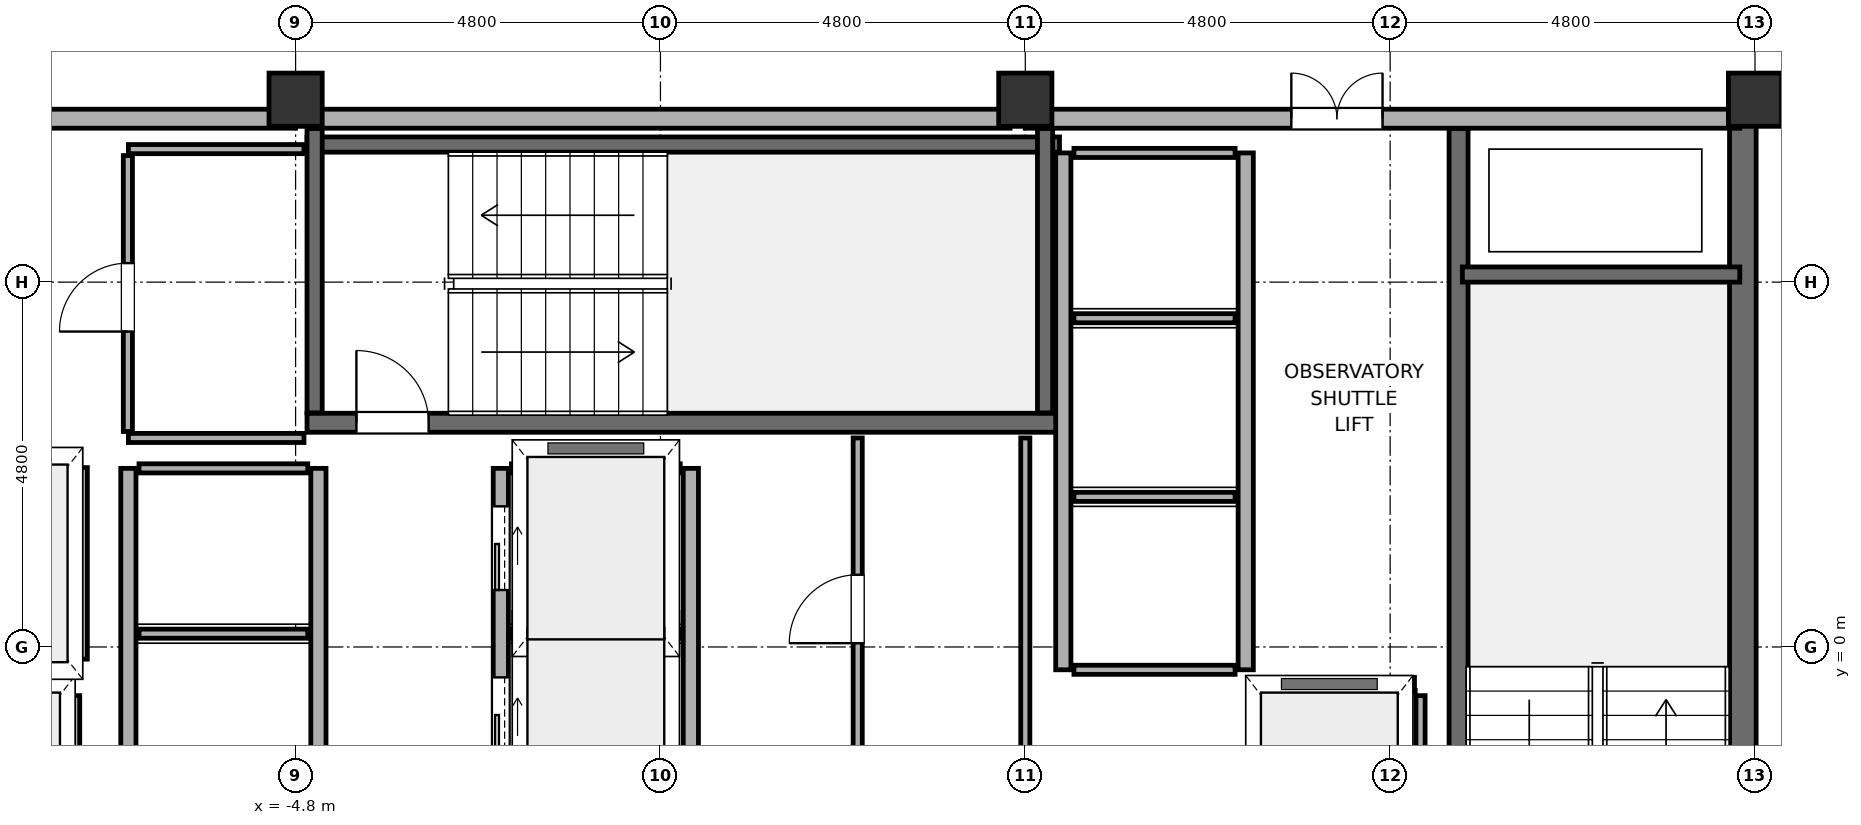
"""IFC4 building model, lengths in metres.
Left out: names, types, materials, properties, quantities, classifications, styles, units other than length and angle.
Written with IfcOpenShell. Run it as: python <this file> out.ifc"""

import sys

from ifc_helpers import new_model, si_unit, direction, frame, frame_2d, origin, origin_2d, place, context, subcontext, project, spatial, rectangle, hollow_rectangle, extrude, element, fill, save


model = new_model("IFC4")
c1 = context("Model", 3, precision=1e-05, world=origin(), true_north=direction((0.0, 1.0)))
c2 = subcontext(c1, "Body", "Model", "MODEL_VIEW")
j1 = project(units=[si_unit("LENGTHUNIT", "METRE"), si_unit("PLANEANGLEUNIT", "RADIAN")], contexts=[c1])
p1 = place(None, origin())
s1 = spatial("IfcSite", under=j1, at=p1, CompositionType="ELEMENT")
p2 = place(p1, origin())
s2 = spatial("IfcBuilding", under=s1, at=p2, CompositionType="ELEMENT")
p3 = place(p2, frame((0.0, 0.0, 124.8)))
s3 = spatial("IfcBuildingStorey", under=s2, at=p3, CompositionType="ELEMENT", Elevation=124.8)
for number, where, z_axis, x_axis in (
    (1, (-4.8, 7.2, 0.0), (0.0, 0.0, 1.0), (1.0, 0.0, 0.0)),
    (2, (4.8, 7.2, 0.0), (0.0, 0.0, 1.0), (1.0, 0.0, 0.0)),
    (3, (14.4, 7.2, 0.0), (0.0, 0.0, 1.0), (1.0, 0.0, 0.0)),
):
    element("IfcColumn", number, at=place(p3, frame(where, z_axis=z_axis, x_axis=x_axis)), inside=s3, PredefinedType="COLUMN", context=c2, shape_type="SweptSolid", body=[
        extrude(hollow_rectangle(XDim=0.7, YDim=0.7, WallThickness=0.032, at=origin_2d()), origin(), (0.0, 0.0, 1.0), 3.7),
    ])
p4 = place(p3, frame((14.24, -7.2, -0.18), z_axis=(0.0, 0.0, 1.0), x_axis=(0.0, 1.0, 0.0)))
e4 = element("IfcWall", 4, at=p4, inside=s3, PredefinedType="SHEAR", context=c2, shape_type="SweptSolid", body=[
    extrude(rectangle(XDim=14.4, YDim=0.35, at=frame_2d((7.2, 0.0))), origin(), (0.0, 0.0, 1.0), 3.7),
])
p5 = place(p3, frame((-14.2, 6.95, 0.0), z_axis=(0.0, 0.0, 1.0), x_axis=(1.0, 0.0, 0.0)))
e5 = element("IfcWall", 5, at=p5, inside=s3, PredefinedType="SOLIDWALL", context=c2, shape_type="SweptSolid", body=[
    extrude(rectangle(XDim=9.4, YDim=0.25, at=frame_2d((4.7, 0.0))), origin(), (0.0, 0.0, 1.0), 2.12),
])
p6 = place(p5, frame((4.9, 0.0, 0.0)))
e6 = element("IfcOpeningElement", 6, at=p6, cuts=e5, PredefinedType="OPENING", context=c2, shape_type="SweptSolid", body=[
    extrude(rectangle(XDim=1.0, YDim=2.02, at=frame_2d((0.5, 1.01))), frame((0.0, 0.14, 0.0), z_axis=(0.0, -1.0, 0.0), x_axis=(1.0, 0.0, 0.0)), (0.0, 0.0, 1.0), 0.28),
])
p7 = place(p3, frame((-4.6, 6.95, 0.0), z_axis=(0.0, 0.0, 1.0), x_axis=(1.0, 0.0, 0.0)))
e7 = element("IfcWall", 7, at=p7, inside=s3, PredefinedType="SOLIDWALL", context=c2, shape_type="SweptSolid", body=[
    extrude(rectangle(XDim=9.2, YDim=0.25, at=frame_2d((4.6, 0.0))), origin(), (0.0, 0.0, 1.0), 2.12),
])
p8 = place(p3, frame((4.8, 6.95, 0.0), z_axis=(0.0, 0.0, 1.0), x_axis=(1.0, 0.0, 0.0)))
e8 = element("IfcWall", 8, at=p8, inside=s3, PredefinedType="SOLIDWALL", context=c2, shape_type="SweptSolid", body=[
    extrude(rectangle(XDim=9.4, YDim=0.25, at=frame_2d((4.7, 0.0))), origin(), (0.0, 0.0, 1.0), 2.12),
])
p9 = place(p8, frame((3.5, 0.0, 0.0)))
e9 = element("IfcOpeningElement", 9, at=p9, cuts=e8, PredefinedType="OPENING", context=c2, shape_type="SweptSolid", body=[
    extrude(rectangle(XDim=1.2, YDim=2.02, at=frame_2d((0.6, 1.01))), frame((0.0, 0.14, 0.0), z_axis=(0.0, -1.0, 0.0), x_axis=(1.0, 0.0, 0.0)), (0.0, 0.0, 1.0), 0.28),
])
p10 = place(p3, frame((10.5, -6.82, -0.18), z_axis=(0.0, 0.0, 1.0), x_axis=(0.0, 1.0, 0.0)))
e10 = element("IfcWall", 10, at=p10, inside=s3, PredefinedType="SOLIDWALL", context=c2, shape_type="SweptSolid", body=[
    extrude(rectangle(XDim=13.64, YDim=0.25, at=frame_2d((6.82, 0.0))), origin(), (0.0, 0.0, 1.0), 3.7),
])
p11 = place(p10, frame((2.32, 0.0, 0.18)))
e11 = element("IfcOpeningElement", 11, at=p11, cuts=e10, PredefinedType="OPENING", context=c2, shape_type="SweptSolid", body=[
    extrude(rectangle(XDim=0.95, YDim=2.15, at=frame_2d((0.475, 1.075))), frame((0.0, 0.14, 0.0), z_axis=(0.0, -1.0, 0.0), x_axis=(1.0, 0.0, 0.0)), (0.0, 0.0, 1.0), 0.28),
])
p12 = place(p3, frame((10.55, 4.9, -0.18), z_axis=(0.0, 0.0, 1.0), x_axis=(1.0, 0.0, 0.0)))
e12 = element("IfcWall", 12, at=p12, inside=s3, PredefinedType="SOLIDWALL", context=c2, shape_type="SweptSolid", body=[
    extrude(rectangle(XDim=3.65, YDim=0.2, at=frame_2d((1.825, 0.0))), origin(), (0.0, 0.0, 1.0), 3.7),
])
p13 = place(p3, frame((-4.65, 2.95, -0.18), z_axis=(0.0, 0.0, 1.0), x_axis=(1.0, 0.0, 0.0)))
e13 = element("IfcWall", 13, at=p13, inside=s3, PredefinedType="SOLIDWALL", context=c2, shape_type="SweptSolid", body=[
    extrude(rectangle(XDim=9.9, YDim=0.25, at=frame_2d((4.95, 0.0))), origin(), (0.0, 0.0, 1.0), 3.7),
])
p14 = place(p13, frame((0.65, 0.0, 0.18)))
e14 = element("IfcOpeningElement", 14, at=p14, cuts=e13, PredefinedType="OPENING", context=c2, shape_type="SweptSolid", body=[
    extrude(rectangle(XDim=0.95, YDim=2.15, at=frame_2d((0.475, 1.075))), frame((0.0, 0.14, 0.0), z_axis=(0.0, -1.0, 0.0), x_axis=(1.0, 0.0, 0.0)), (0.0, 0.0, 1.0), 0.28),
])
p15 = place(p3, frame((-4.65, 6.61, -0.18), z_axis=(0.0, 0.0, 1.0), x_axis=(1.0, 0.0, 0.0)))
e15 = element("IfcWall", 15, at=p15, inside=s3, PredefinedType="SOLIDWALL", context=c2, shape_type="SweptSolid", body=[
    extrude(rectangle(XDim=9.9, YDim=0.2, at=frame_2d((4.95, 0.0))), origin(), (0.0, 0.0, 1.0), 3.7),
])
for number, where, z_axis, x_axis in (
    (16, (-4.55, 3.08, -0.18), (0.0, 0.0, 1.0), (0.0, 1.0, 0.0)),
    (17, (5.06, 3.08, -0.18), (0.0, 0.0, 1.0), (0.0, 1.0, 0.0)),
):
    element("IfcWall", number, at=place(p3, frame(where, z_axis=z_axis, x_axis=x_axis)), inside=s3, PredefinedType="SOLIDWALL", context=c2, shape_type="SweptSolid", body=[
        extrude(rectangle(XDim=3.74, YDim=0.2, at=frame_2d((1.87, 0.0))), origin(), (0.0, 0.0, 1.0), 3.7),
    ])
for number, where, z_axis, x_axis in (
    (18, (-4.5, -6.5, 0.0), (0.0, 0.0, 1.0), (0.0, 1.0, 0.0)),
    (19, (-7.0, -6.5, 0.0), (0.0, 0.0, 1.0), (0.0, 1.0, 0.0)),
):
    element("IfcWall", number, at=place(p3, frame(where, z_axis=z_axis, x_axis=x_axis)), inside=s3, PredefinedType="SOLIDWALL", context=c2, shape_type="SweptSolid", body=[
        extrude(rectangle(XDim=8.85, YDim=0.2, at=frame_2d((4.425, 0.0))), origin(), (0.0, 0.0, 1.0), 3.52),
    ])
for number, where, z_axis, x_axis in (
    (20, (-6.86, 0.175, 0.0), (0.0, 0.0, 1.0), (1.0, 0.0, 0.0)),
    (21, (-6.86, 2.35, 0.0), (0.0, 0.0, 1.0), (1.0, 0.0, 0.0)),
):
    element("IfcWall", number, at=place(p3, frame(where, z_axis=z_axis, x_axis=x_axis)), inside=s3, PredefinedType="PARTITIONING", context=c2, shape_type="SweptSolid", body=[
        extrude(rectangle(XDim=2.22, YDim=0.12, at=frame_2d((1.11, 0.0))), origin(), (0.0, 0.0, 1.0), 3.52),
    ])
p16 = place(p3, frame((-2.1, -6.5, 0.0), z_axis=(0.0, 0.0, 1.0), x_axis=(0.0, 1.0, 0.0)))
e22 = element("IfcWall", 22, at=p16, inside=s3, PredefinedType="SOLIDWALL", context=c2, shape_type="SweptSolid", body=[
    extrude(rectangle(XDim=8.85, YDim=0.2, at=frame_2d((4.425, 0.0))), origin(), (0.0, 0.0, 1.0), 3.52),
])
p17 = place(p16, frame((0.5, 0.0, 0.0)))
e23 = element("IfcOpeningElement", 23, at=p17, cuts=e22, PredefinedType="OPENING", context=c2, shape_type="SweptSolid", body=[
    extrude(rectangle(XDim=1.1, YDim=2.2, at=frame_2d((0.55, 1.1))), frame((0.0, 0.115, 0.0), z_axis=(0.0, -1.0, 0.0), x_axis=(1.0, 0.0, 0.0)), (0.0, 0.0, 1.0), 0.23),
])
p18 = place(p16, frame((2.75, 0.0, 0.0)))
e24 = element("IfcOpeningElement", 24, at=p18, cuts=e22, PredefinedType="OPENING", context=c2, shape_type="SweptSolid", body=[
    extrude(rectangle(XDim=1.1, YDim=2.2, at=frame_2d((0.55, 1.1))), frame((0.0, 0.115, 0.0), z_axis=(0.0, -1.0, 0.0), x_axis=(1.0, 0.0, 0.0)), (0.0, 0.0, 1.0), 0.23),
])
p19 = place(p16, frame((5.0, 0.0, 0.0)))
e25 = element("IfcOpeningElement", 25, at=p19, cuts=e22, PredefinedType="OPENING", context=c2, shape_type="SweptSolid", body=[
    extrude(rectangle(XDim=1.1, YDim=2.2, at=frame_2d((0.55, 1.1))), frame((0.0, 0.115, 0.0), z_axis=(0.0, -1.0, 0.0), x_axis=(1.0, 0.0, 0.0)), (0.0, 0.0, 1.0), 0.23),
])
p20 = place(p16, frame((7.25, 0.0, 0.0)))
e26 = element("IfcOpeningElement", 26, at=p20, cuts=e22, PredefinedType="OPENING", context=c2, shape_type="SweptSolid", body=[
    extrude(rectangle(XDim=1.1, YDim=2.2, at=frame_2d((0.55, 1.1))), frame((0.0, 0.115, 0.0), z_axis=(0.0, -1.0, 0.0), x_axis=(1.0, 0.0, 0.0)), (0.0, 0.0, 1.0), 0.23),
])
p21 = place(p3, frame((0.4, -6.5, 0.0), z_axis=(0.0, 0.0, 1.0), x_axis=(0.0, 1.0, 0.0)))
e27 = element("IfcWall", 27, at=p21, inside=s3, PredefinedType="SOLIDWALL", context=c2, shape_type="SweptSolid", body=[
    extrude(rectangle(XDim=8.85, YDim=0.2, at=frame_2d((4.425, 0.0))), origin(), (0.0, 0.0, 1.0), 3.52),
])
for number, where, z_axis, x_axis in (
    (28, (-1.96, 0.175, 0.0), (0.0, 0.0, 1.0), (1.0, 0.0, 0.0)),
    (29, (-1.96, 2.35, 0.0), (0.0, 0.0, 1.0), (1.0, 0.0, 0.0)),
):
    element("IfcWall", number, at=place(p3, frame(where, z_axis=z_axis, x_axis=x_axis)), inside=s3, PredefinedType="PARTITIONING", context=c2, shape_type="SweptSolid", body=[
        extrude(rectangle(XDim=2.22, YDim=0.12, at=frame_2d((1.11, 0.0))), origin(), (0.0, 0.0, 1.0), 3.52),
    ])
for number, where, z_axis, x_axis in (
    (30, (7.7, -0.3, 0.0), (0.0, 0.0, 1.0), (0.0, 1.0, 0.0)),
    (31, (5.3, -0.3, 0.0), (0.0, 0.0, 1.0), (0.0, 1.0, 0.0)),
):
    element("IfcWall", number, at=place(p3, frame(where, z_axis=z_axis, x_axis=x_axis)), inside=s3, PredefinedType="SOLIDWALL", context=c2, shape_type="SweptSolid", body=[
        extrude(rectangle(XDim=6.8, YDim=0.2, at=frame_2d((3.4, 0.0))), origin(), (0.0, 0.0, 1.0), 3.52),
    ])
for number, where, z_axis, x_axis in (
    (32, (5.44, -0.3, 0.0), (0.0, 0.0, 1.0), (1.0, 0.0, 0.0)),
    (33, (5.44, 1.975, 0.0), (0.0, 0.0, 1.0), (1.0, 0.0, 0.0)),
    (34, (5.44, 4.325, 0.0), (0.0, 0.0, 1.0), (1.0, 0.0, 0.0)),
    (35, (5.44, 6.5, 0.0), (0.0, 0.0, 1.0), (1.0, 0.0, 0.0)),
):
    element("IfcWall", number, at=place(p3, frame(where, z_axis=z_axis, x_axis=x_axis)), inside=s3, PredefinedType="PARTITIONING", context=c2, shape_type="SweptSolid", body=[
        extrude(rectangle(XDim=2.12, YDim=0.12, at=frame_2d((1.06, 0.0))), origin(), (0.0, 0.0, 1.0), 3.52),
    ])
p22 = place(p3, frame((-9.82, -0.5, 0.0), z_axis=(0.0, 0.0, 1.0), x_axis=(1.0, 0.0, 0.0)))
e36 = element("IfcWall", 36, at=p22, inside=s3, PredefinedType="SOLIDWALL", context=c2, shape_type="SweptSolid", body=[
    extrude(rectangle(XDim=2.04, YDim=0.2, at=frame_2d((1.02, 0.0))), origin(), (0.0, 0.0, 1.0), 3.52),
])
p23 = place(p3, frame((-7.7, -2.96, 0.0), z_axis=(0.0, 0.0, 1.0), x_axis=(0.0, 1.0, 0.0)))
e37 = element("IfcWall", 37, at=p23, inside=s3, PredefinedType="PARTITIONING", context=c2, shape_type="SweptSolid", body=[
    extrude(rectangle(XDim=2.32, YDim=0.12, at=frame_2d((1.16, 0.0))), origin(), (0.0, 0.0, 1.0), 3.52),
])
p24 = place(p3, frame((7.88, -0.5, 0.0), z_axis=(0.0, 0.0, 1.0), x_axis=(1.0, 0.0, 0.0)))
e38 = element("IfcWall", 38, at=p24, inside=s3, PredefinedType="SOLIDWALL", context=c2, shape_type="SweptSolid", body=[
    extrude(rectangle(XDim=2.04, YDim=0.2, at=frame_2d((1.02, 0.0))), origin(), (0.0, 0.0, 1.0), 3.52),
])
for number, where, z_axis, x_axis in (
    (39, (7.8, -2.96, 0.0), (0.0, 0.0, 1.0), (0.0, 1.0, 0.0)),
    (40, (10.0, -2.96, 0.0), (0.0, 0.0, 1.0), (0.0, 1.0, 0.0)),
):
    element("IfcWall", number, at=place(p3, frame(where, z_axis=z_axis, x_axis=x_axis)), inside=s3, PredefinedType="PARTITIONING", context=c2, shape_type="SweptSolid", body=[
        extrude(rectangle(XDim=2.32, YDim=0.12, at=frame_2d((1.16, 0.0))), origin(), (0.0, 0.0, 1.0), 3.52),
    ])
p25 = place(p3, frame((-9.92, 2.5, 0.0), z_axis=(0.0, 0.0, 1.0), x_axis=(1.0, 0.0, 0.0)))
e41 = element("IfcWall", 41, at=p25, inside=s3, PredefinedType="SOLIDWALL", context=c2, shape_type="SweptSolid", body=[
    extrude(rectangle(XDim=2.24, YDim=0.2, at=frame_2d((1.12, 0.0))), origin(), (0.0, 0.0, 1.0), 3.52),
])
p26 = place(p25, frame((0.495, 0.0, 0.0)))
e42 = element("IfcOpeningElement", 42, at=p26, cuts=e41, PredefinedType="OPENING", context=c2, shape_type="SweptSolid", body=[
    extrude(rectangle(XDim=1.25, YDim=2.25, at=frame_2d((0.625, 1.125))), frame((0.0, 0.115, 0.0), z_axis=(0.0, -1.0, 0.0), x_axis=(1.0, 0.0, 0.0)), (0.0, 0.0, 1.0), 0.23),
])
p27 = place(p3, frame((-9.92, -0.3, 0.0), z_axis=(0.0, 0.0, 1.0), x_axis=(1.0, 0.0, 0.0)))
e43 = element("IfcWall", 43, at=p27, inside=s3, PredefinedType="SOLIDWALL", context=c2, shape_type="SweptSolid", body=[
    extrude(rectangle(XDim=2.24, YDim=0.2, at=frame_2d((1.12, 0.0))), origin(), (0.0, 0.0, 1.0), 3.52),
])
p28 = place(p3, frame((-7.6, -0.16, 0.0), z_axis=(0.0, 0.0, 1.0), x_axis=(0.0, 1.0, 0.0)))
e44 = element("IfcWall", 44, at=p28, inside=s3, PredefinedType="PARTITIONING", context=c2, shape_type="SweptSolid", body=[
    extrude(rectangle(XDim=2.52, YDim=0.12, at=frame_2d((1.26, 0.0))), origin(), (0.0, 0.0, 1.0), 3.52),
])
for number, where, z_axis, x_axis in (
    (45, (-7.0, 2.75, 0.0), (0.0, 0.0, 1.0), (1.0, 0.0, 0.0)),
    (46, (-7.0, 6.55, 0.0), (0.0, 0.0, 1.0), (1.0, 0.0, 0.0)),
):
    element("IfcWall", number, at=place(p3, frame(where, z_axis=z_axis, x_axis=x_axis)), inside=s3, PredefinedType="PARTITIONING", context=c2, shape_type="SweptSolid", body=[
        extrude(rectangle(XDim=2.31, YDim=0.12, at=frame_2d((1.155, 0.0))), origin(), (0.0, 0.0, 1.0), 3.52),
    ])
p29 = place(p3, frame((14.52, 6.98, 0.0), z_axis=(0.0, 0.0, 1.0), x_axis=(1.0, 0.0, 0.0)))
e47 = element("IfcWall", 47, at=p29, inside=s3, PredefinedType="PARTITIONING", context=c2, shape_type="SweptSolid", body=[
    extrude(rectangle(XDim=14.11, YDim=0.15, at=frame_2d((7.055, 0.0))), origin(), (0.0, 0.0, 1.0), 2.12),
])
p30 = place(p29, frame((6.63, 0.0, 0.0)))
e48 = element("IfcOpeningElement", 48, at=p30, cuts=e47, PredefinedType="OPENING", context=c2, shape_type="SweptSolid", body=[
    extrude(rectangle(XDim=0.9, YDim=2.02, at=frame_2d((0.45, 1.01))), frame((0.0, 0.09, 0.0), z_axis=(0.0, -1.0, 0.0), x_axis=(1.0, 0.0, 0.0)), (0.0, 0.0, 1.0), 0.18),
])
p31 = place(p3, frame((-7.007, 2.835, 0.0), z_axis=(0.0, 0.0, 1.0), x_axis=(0.0, 1.0, 0.0)))
e49 = element("IfcWall", 49, at=p31, inside=s3, PredefinedType="PARTITIONING", context=c2, shape_type="SweptSolid", body=[
    extrude(rectangle(XDim=3.63, YDim=0.12, at=frame_2d((1.815, 0.0))), origin(), (0.0, 0.0, 1.0), 3.52),
])
p32 = place(p31, frame((1.315, 0.0, 0.0)))
e50 = element("IfcOpeningElement", 50, at=p32, cuts=e49, PredefinedType="OPENING", context=c2, shape_type="SweptSolid", body=[
    extrude(rectangle(XDim=0.9, YDim=2.1, at=frame_2d((0.45, 1.05))), frame((0.0, 0.075, 0.0), z_axis=(0.0, -1.0, 0.0), x_axis=(1.0, 0.0, 0.0)), (0.0, 0.0, 1.0), 0.15),
])
p33 = place(p3, frame((2.595, -6.415, 0.0), z_axis=(0.0, 0.0, 1.0), x_axis=(0.0, 1.0, 0.0)))
e51 = element("IfcWall", 51, at=p33, inside=s3, PredefinedType="PARTITIONING", context=c2, shape_type="SweptSolid", body=[
    extrude(rectangle(XDim=9.165, YDim=0.12, at=frame_2d((4.583, 0.0))), origin(), (0.0, 0.0, 1.0), 3.52),
])
p34 = place(p33, frame((1.465, 0.0, 0.0)))
e52 = element("IfcOpeningElement", 52, at=p34, cuts=e51, PredefinedType="OPENING", context=c2, shape_type="SweptSolid", body=[
    extrude(rectangle(XDim=0.9, YDim=2.1, at=frame_2d((0.45, 1.05))), frame((0.0, 0.075, 0.0), z_axis=(0.0, -1.0, 0.0), x_axis=(1.0, 0.0, 0.0)), (0.0, 0.0, 1.0), 0.15),
])
p35 = place(p33, frame((6.465, 0.0, 0.0)))
e53 = element("IfcOpeningElement", 53, at=p35, cuts=e51, PredefinedType="OPENING", context=c2, shape_type="SweptSolid", body=[
    extrude(rectangle(XDim=0.9, YDim=2.1, at=frame_2d((0.45, 1.05))), frame((0.0, 0.075, 0.0), z_axis=(0.0, -1.0, 0.0), x_axis=(1.0, 0.0, 0.0)), (0.0, 0.0, 1.0), 0.15),
])
p36 = place(p3, frame((4.8, -6.415, 0.0), z_axis=(0.0, 0.0, 1.0), x_axis=(0.0, 1.0, 0.0)))
e54 = element("IfcWall", 54, at=p36, inside=s3, PredefinedType="PARTITIONING", context=c2, shape_type="SweptSolid", body=[
    extrude(rectangle(XDim=9.165, YDim=0.12, at=frame_2d((4.583, 0.0))), origin(), (0.0, 0.0, 1.0), 3.52),
])
p37 = place(p9, origin())
e55 = element("IfcDoor", 55, at=p37, inside=s3, OperationType="DOUBLE_DOOR_SINGLE_SWING", PredefinedType="DOOR", context=c2, shape_type="SweptSolid", body=[
    extrude(rectangle(XDim=1.2, YDim=2.02, at=frame_2d((0.6, 1.01))), frame((0.0, 0.025, 0.0), z_axis=(0.0, -1.0, 0.0), x_axis=(1.0, 0.0, 0.0)), (0.0, 0.0, 1.0), 0.05),
])
fill(e9, e55)
p38 = place(p14, origin())
e56 = element("IfcDoor", 56, at=p38, inside=s3, OperationType="SINGLE_SWING_LEFT", PredefinedType="DOOR", context=c2, shape_type="SweptSolid", body=[
    extrude(rectangle(XDim=0.95, YDim=2.15, at=frame_2d((0.475, 1.075))), frame((0.0, 0.025, 0.0), z_axis=(0.0, -1.0, 0.0), x_axis=(1.0, 0.0, 0.0)), (0.0, 0.0, 1.0), 0.05),
])
fill(e14, e56)
p39 = place(p19, origin())
e57 = element("IfcDoor", 57, at=p39, inside=s3, OperationType="SLIDING_TO_LEFT", PredefinedType="DOOR", context=c2, shape_type="SweptSolid", body=[
    extrude(rectangle(XDim=1.1, YDim=2.2, at=frame_2d((0.55, 1.1))), frame((0.0, 0.025, 0.0), z_axis=(0.0, -1.0, 0.0), x_axis=(1.0, 0.0, 0.0)), (0.0, 0.0, 1.0), 0.05),
])
fill(e25, e57)
p40 = place(p20, origin())
e58 = element("IfcDoor", 58, at=p40, inside=s3, OperationType="SLIDING_TO_LEFT", PredefinedType="DOOR", context=c2, shape_type="SweptSolid", body=[
    extrude(rectangle(XDim=1.1, YDim=2.2, at=frame_2d((0.55, 1.1))), frame((0.0, 0.025, 0.0), z_axis=(0.0, -1.0, 0.0), x_axis=(1.0, 0.0, 0.0)), (0.0, 0.0, 1.0), 0.05),
])
fill(e26, e58)
p41 = place(p32, origin())
e59 = element("IfcDoor", 59, at=p41, inside=s3, OperationType="SINGLE_SWING_RIGHT", PredefinedType="DOOR", context=c2, shape_type="SweptSolid", body=[
    extrude(rectangle(XDim=0.9, YDim=2.1, at=frame_2d((0.45, 1.05))), frame((0.0, 0.025, 0.0), z_axis=(0.0, -1.0, 0.0), x_axis=(1.0, 0.0, 0.0)), (0.0, 0.0, 1.0), 0.05),
])
fill(e50, e59)
p42 = place(p35, origin())
e60 = element("IfcDoor", 60, at=p42, inside=s3, OperationType="SINGLE_SWING_RIGHT", PredefinedType="DOOR", context=c2, shape_type="SweptSolid", body=[
    extrude(rectangle(XDim=0.9, YDim=2.1, at=frame_2d((0.45, 1.05))), frame((0.0, 0.025, 0.0), z_axis=(0.0, -1.0, 0.0), x_axis=(1.0, 0.0, 0.0)), (0.0, 0.0, 1.0), 0.05),
])
fill(e53, e60)
save(model, sys.argv[1])
